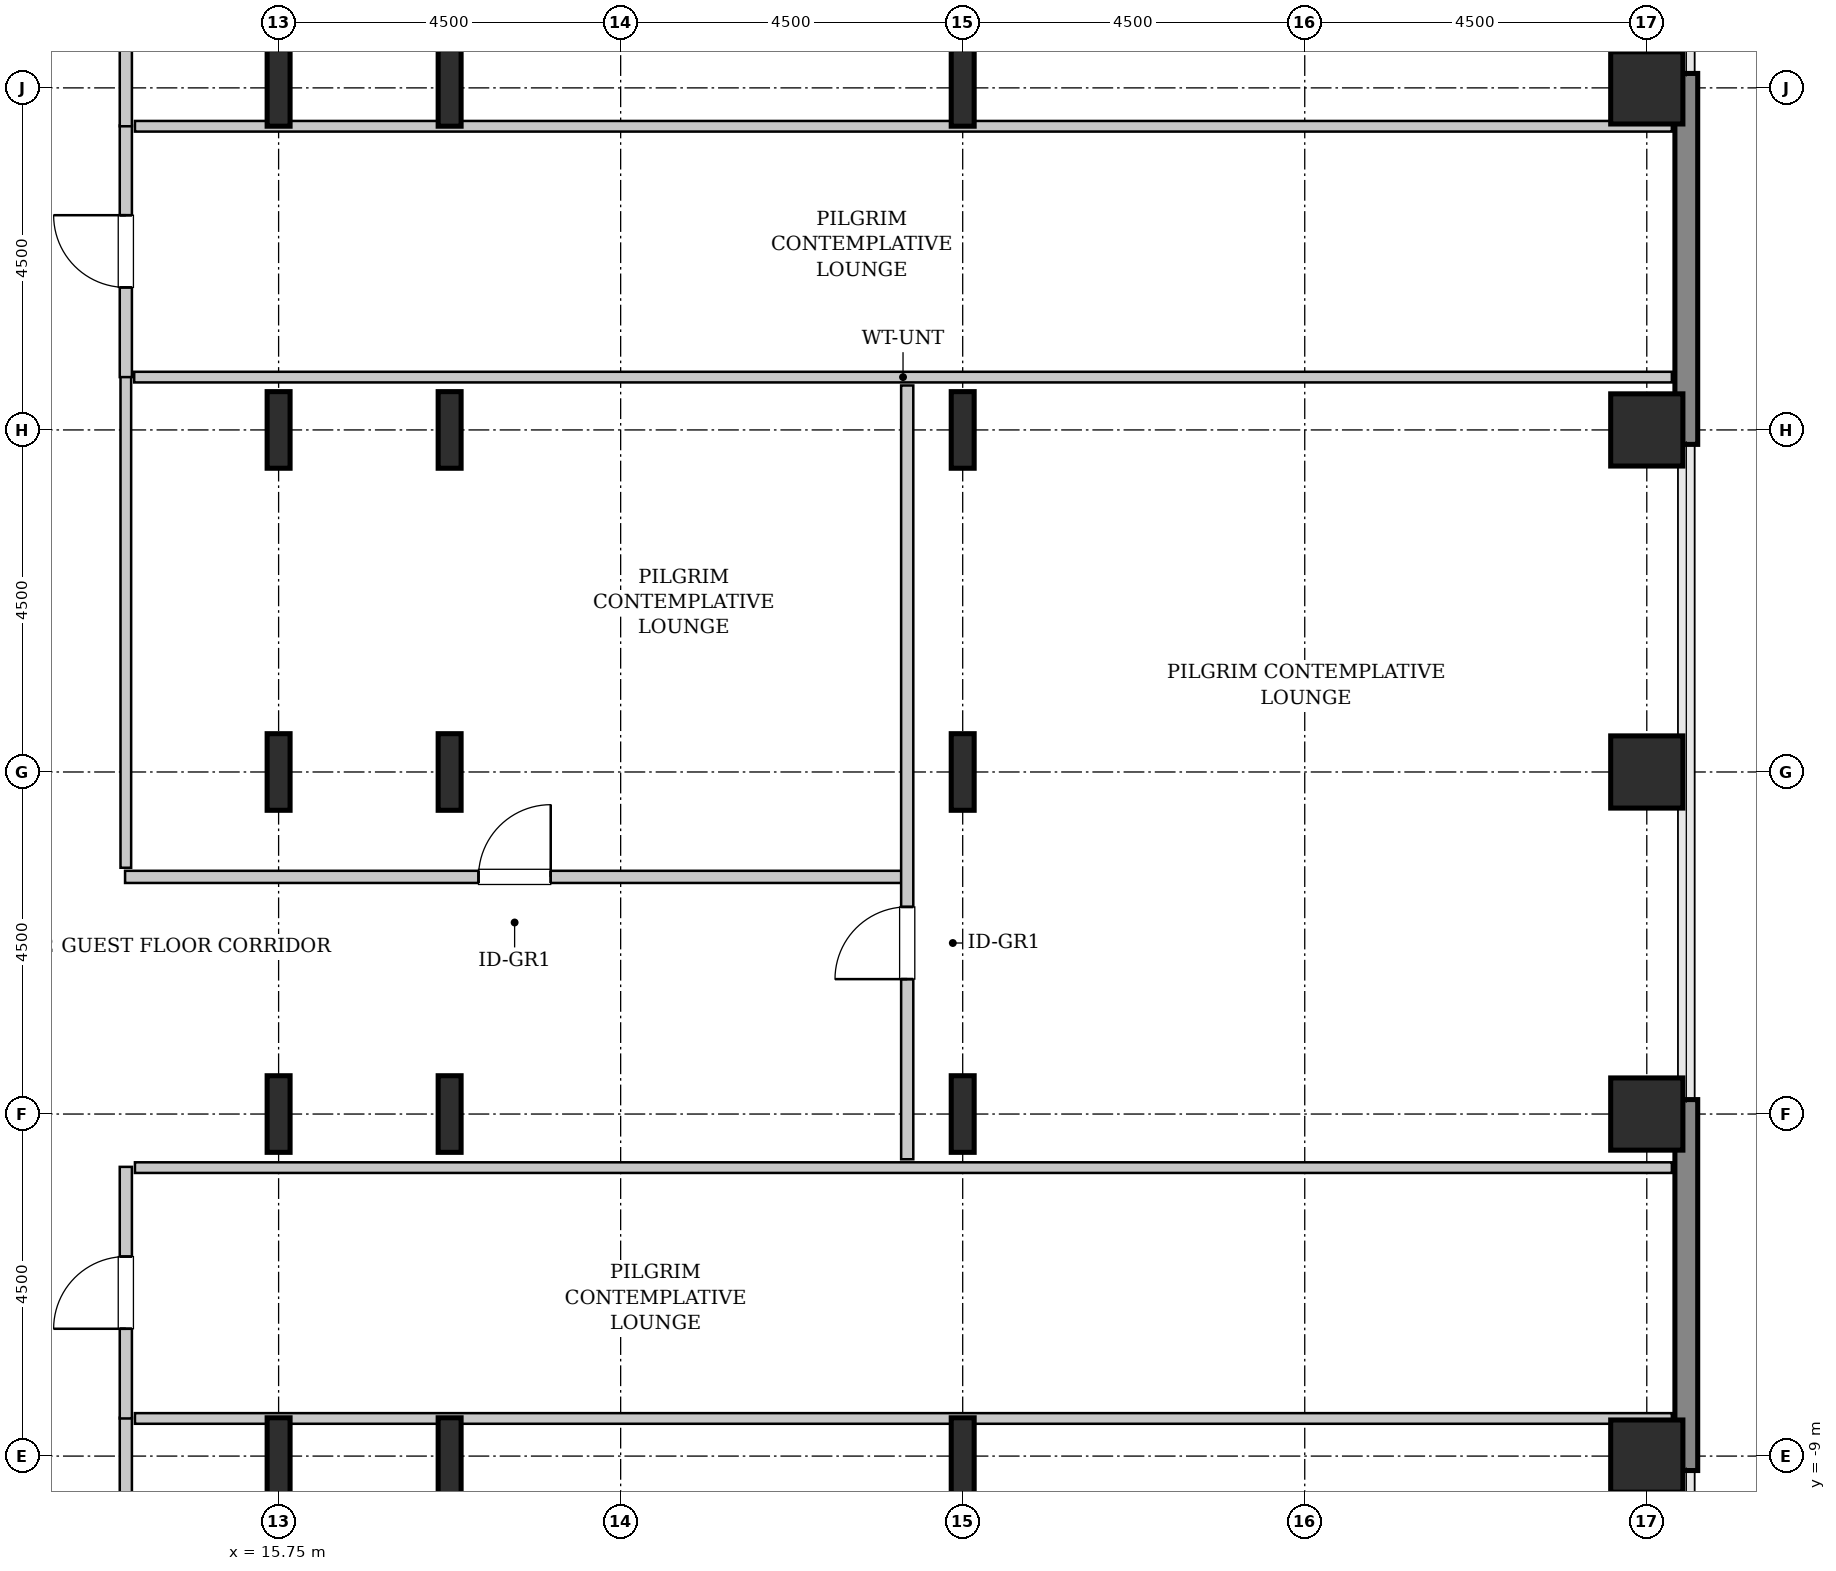
"""IFC4 building model, lengths in metres.
Left out: names, types, materials, properties, quantities, classifications, styles, units other than length and angle.
Written with IfcOpenShell. Run it as: python <this file> out.ifc"""

import sys

from ifc_helpers import new_model, si_unit, direction, frame, frame_2d, origin, origin_2d, place, context, subcontext, project, spatial, rectangle, hollow_rectangle, i_section, extrude, source, transform, mapped, element, fill, save


model = new_model("IFC4")
c1 = context("Model", 3, precision=1e-05, world=origin(), true_north=direction((0.0, 1.0)))
c2 = subcontext(c1, "Body", "Model", "MODEL_VIEW")
j1 = project(units=[si_unit("LENGTHUNIT", "METRE"), si_unit("PLANEANGLEUNIT", "RADIAN")], contexts=[c1])
p1 = place(None, origin())
s1 = spatial("IfcSite", under=j1, at=p1, CompositionType="ELEMENT")
p2 = place(p1, origin())
s2 = spatial("IfcBuilding", under=s1, at=p2, CompositionType="ELEMENT")
p3 = place(p2, frame((0.0, 0.0, 55.8)))
s3 = spatial("IfcBuildingStorey", under=s2, at=p3, CompositionType="ELEMENT", Elevation=55.8)
m1 = source(origin(), c2, "Body", "SweptSolid", [
    extrude(i_section(OverallWidth=0.302, OverallDepth=1.008, WebThickness=0.021, FlangeThickness=0.04, FilletRadius=0.03, at=origin_2d()), origin(), (0.0, 0.0, 1.0), 3.8),
])
for number, where, z_axis, x_axis in (
    (1, (15.75, -9.0, 0.0), (0.0, 0.0, 1.0), (1.0, 0.0, 0.0)),
    (2, (15.75, -4.5, 0.0), (0.0, 0.0, 1.0), (1.0, 0.0, 0.0)),
    (3, (15.75, 0.0, 0.0), (0.0, 0.0, 1.0), (1.0, 0.0, 0.0)),
    (4, (15.75, 4.5, 0.0), (0.0, 0.0, 1.0), (1.0, 0.0, 0.0)),
    (5, (15.75, 9.0, 0.0), (0.0, 0.0, 1.0), (1.0, 0.0, 0.0)),
    (6, (18.0, -9.0, 0.0), (0.0, 0.0, 1.0), (1.0, 0.0, 0.0)),
    (7, (18.0, -4.5, 0.0), (0.0, 0.0, 1.0), (1.0, 0.0, 0.0)),
    (8, (18.0, 0.0, 0.0), (0.0, 0.0, 1.0), (1.0, 0.0, 0.0)),
    (9, (18.0, 4.5, 0.0), (0.0, 0.0, 1.0), (1.0, 0.0, 0.0)),
    (10, (18.0, 9.0, 0.0), (0.0, 0.0, 1.0), (1.0, 0.0, 0.0)),
    (11, (24.75, -9.0, 0.0), (0.0, 0.0, 1.0), (1.0, 0.0, 0.0)),
    (12, (24.75, -4.5, 0.0), (0.0, 0.0, 1.0), (1.0, 0.0, 0.0)),
    (13, (24.75, 0.0, 0.0), (0.0, 0.0, 1.0), (1.0, 0.0, 0.0)),
    (14, (24.75, 4.5, 0.0), (0.0, 0.0, 1.0), (1.0, 0.0, 0.0)),
    (15, (24.75, 9.0, 0.0), (0.0, 0.0, 1.0), (1.0, 0.0, 0.0)),
):
    element("IfcColumn", number, at=place(p3, frame(where, z_axis=z_axis, x_axis=x_axis)), inside=s3, PredefinedType="COLUMN", context=c2, shape_type="MappedRepresentation", body=[
        mapped(m1, transform((0.0, 0.0, 0.0), x_axis=(1.0, 0.0, 0.0), y_axis=(0.0, 1.0, 0.0), z_axis=(0.0, 0.0, 1.0), scale=1.0)),
    ])
m2 = source(origin(), c2, "Body", "SweptSolid", [
    extrude(hollow_rectangle(XDim=0.95, YDim=0.95, WallThickness=0.045, InnerFilletRadius=0.045, OuterFilletRadius=0.09, at=origin_2d()), origin(), (0.0, 0.0, 1.0), 3.8),
])
for number, where, z_axis, x_axis in (
    (16, (33.75, -9.0, 0.0), (0.0, 0.0, 1.0), (1.0, 0.0, 0.0)),
    (17, (33.75, -4.5, 0.0), (0.0, 0.0, 1.0), (1.0, 0.0, 0.0)),
    (18, (33.75, 0.0, 0.0), (0.0, 0.0, 1.0), (1.0, 0.0, 0.0)),
    (19, (33.75, 4.5, 0.0), (0.0, 0.0, 1.0), (1.0, 0.0, 0.0)),
    (20, (33.75, 9.0, 0.0), (0.0, 0.0, 1.0), (1.0, 0.0, 0.0)),
):
    element("IfcColumn", number, at=place(p3, frame(where, z_axis=z_axis, x_axis=x_axis)), inside=s3, PredefinedType="COLUMN", context=c2, shape_type="MappedRepresentation", body=[
        mapped(m2, transform((0.0, 0.0, 0.0), x_axis=(1.0, 0.0, 0.0), y_axis=(0.0, 1.0, 0.0), z_axis=(0.0, 0.0, 1.0), scale=1.0)),
    ])
m3 = source(origin(), c2, "Body", "SweptSolid", [
    extrude(rectangle(XDim=4.88, YDim=0.3, at=frame_2d((2.44, 0.0))), origin(), (0.0, 0.0, 1.0), 3.55),
])
for number, where, z_axis, x_axis in (
    (21, (34.27, -9.19, 0.0), (0.0, 0.0, 1.0), (0.0, 1.0, 0.0)),
    (22, (34.27, 4.31, 0.0), (0.0, 0.0, 1.0), (0.0, 1.0, 0.0)),
):
    element("IfcWall", number, at=place(p3, frame(where, z_axis=z_axis, x_axis=x_axis)), inside=s3, PredefinedType="SHEAR", context=c2, shape_type="MappedRepresentation", body=[
        mapped(m3, transform((0.0, 0.0, 0.0), x_axis=(1.0, 0.0, 0.0), y_axis=(0.0, 1.0, 0.0), z_axis=(0.0, 0.0, 1.0), scale=1.0)),
    ])
m4 = source(origin(), c2, "Body", "SweptSolid", [
    extrude(rectangle(XDim=14.545, YDim=0.16, at=frame_2d((7.272, 0.0))), origin(), (0.0, 0.0, 1.0), 3.535),
])
p4 = place(p3, frame((13.74, -23.04, 0.0), z_axis=(0.0, 0.0, 1.0), x_axis=(0.0, 1.0, 0.0)))
e23 = element("IfcWall", 23, at=p4, inside=s3, PredefinedType="PARTITIONING", context=c2, shape_type="MappedRepresentation", body=[
    mapped(m4, transform((0.0, 0.0, 0.0), x_axis=(1.0, 0.0, 0.0), y_axis=(0.0, 1.0, 0.0), z_axis=(0.0, 0.0, 1.0), scale=1.0)),
])
p5 = place(p4, frame((12.562, 0.0, 0.0)))
e24 = element("IfcOpeningElement", 24, at=p5, cuts=e23, PredefinedType="OPENING", context=c2, shape_type="SweptSolid", body=[
    extrude(rectangle(XDim=0.95, YDim=2.1, at=frame_2d((0.475, 1.05))), frame((0.0, 0.09, 0.0), z_axis=(0.0, -1.0, 0.0), x_axis=(1.0, 0.0, 0.0)), (0.0, 0.0, 1.0), 0.18),
])
m5 = source(origin(), c2, "Body", "SweptSolid", [
    extrude(rectangle(XDim=20.22, YDim=0.14, at=frame_2d((10.11, 0.0))), origin(), (0.0, 0.0, 1.0), 2.825),
])
p6 = place(p3, frame((13.86, -8.505, 0.0), z_axis=(0.0, 0.0, 1.0), x_axis=(1.0, 0.0, 0.0)))
e25 = element("IfcWall", 25, at=p6, inside=s3, PredefinedType="PARTITIONING", context=c2, shape_type="MappedRepresentation", body=[
    mapped(m5, transform((0.0, 0.0, 0.0), x_axis=(1.0, 0.0, 0.0), y_axis=(0.0, 1.0, 0.0), z_axis=(0.0, 0.0, 1.0), scale=1.0)),
])
m6 = source(origin(), c2, "Body", "SweptSolid", [
    extrude(rectangle(XDim=3.31, YDim=0.16, at=frame_2d((1.655, 0.0))), origin(), (0.0, 0.0, 1.0), 3.535),
])
p7 = place(p3, frame((13.74, -8.505, 0.0), z_axis=(0.0, 0.0, 1.0), x_axis=(0.0, 1.0, 0.0)))
e26 = element("IfcWall", 26, at=p7, inside=s3, PredefinedType="PARTITIONING", context=c2, shape_type="MappedRepresentation", body=[
    mapped(m6, transform((0.0, 0.0, 0.0), x_axis=(1.0, 0.0, 0.0), y_axis=(0.0, 1.0, 0.0), z_axis=(0.0, 0.0, 1.0), scale=1.0)),
])
p8 = place(p7, frame((1.18, 0.0, 0.0)))
e27 = element("IfcOpeningElement", 27, at=p8, cuts=e26, PredefinedType="OPENING", context=c2, shape_type="SweptSolid", body=[
    extrude(rectangle(XDim=0.95, YDim=2.1, at=frame_2d((0.475, 1.05))), frame((0.0, 0.09, 0.0), z_axis=(0.0, -1.0, 0.0), x_axis=(1.0, 0.0, 0.0)), (0.0, 0.0, 1.0), 0.18),
])
m7 = source(origin(), c2, "Body", "SweptSolid", [
    extrude(rectangle(XDim=20.22, YDim=0.14, at=frame_2d((10.11, 0.0))), origin(), (0.0, 0.0, 1.0), 3.535),
])
p9 = place(p3, frame((13.86, -5.205, 0.0), z_axis=(0.0, 0.0, 1.0), x_axis=(1.0, 0.0, 0.0)))
e28 = element("IfcWall", 28, at=p9, inside=s3, PredefinedType="PARTITIONING", context=c2, shape_type="MappedRepresentation", body=[
    mapped(m7, transform((0.0, 0.0, 0.0), x_axis=(1.0, 0.0, 0.0), y_axis=(0.0, 1.0, 0.0), z_axis=(0.0, 0.0, 1.0), scale=1.0)),
])
m8 = source(origin(), c2, "Body", "SweptSolid", [
    extrude(rectangle(XDim=10.25, YDim=0.16, at=frame_2d((5.125, 0.0))), origin(), (0.0, 0.0, 1.0), 3.535),
])
p10 = place(p3, frame((13.73, -1.38, 0.0), z_axis=(0.0, 0.0, 1.0), x_axis=(1.0, 0.0, 0.0)))
e29 = element("IfcWall", 29, at=p10, inside=s3, PredefinedType="PARTITIONING", context=c2, shape_type="MappedRepresentation", body=[
    mapped(m8, transform((0.0, 0.0, 0.0), x_axis=(1.0, 0.0, 0.0), y_axis=(0.0, 1.0, 0.0), z_axis=(0.0, 0.0, 1.0), scale=1.0)),
])
p11 = place(p10, frame((4.65, 0.0, 0.0)))
e30 = element("IfcOpeningElement", 30, at=p11, cuts=e29, PredefinedType="OPENING", context=c2, shape_type="SweptSolid", body=[
    extrude(rectangle(XDim=0.95, YDim=2.1, at=frame_2d((0.475, 1.05))), frame((0.0, 0.09, 0.0), z_axis=(0.0, -1.0, 0.0), x_axis=(1.0, 0.0, 0.0)), (0.0, 0.0, 1.0), 0.18),
])
m9 = source(origin(), c2, "Body", "SweptSolid", [
    extrude(rectangle(XDim=6.465, YDim=0.14, at=frame_2d((3.232, 0.0))), origin(), (0.0, 0.0, 1.0), 3.535),
])
p12 = place(p3, frame((13.74, -1.26, 0.0), z_axis=(0.0, 0.0, 1.0), x_axis=(0.0, 1.0, 0.0)))
e31 = element("IfcWall", 31, at=p12, inside=s3, PredefinedType="PARTITIONING", context=c2, shape_type="MappedRepresentation", body=[
    mapped(m9, transform((0.0, 0.0, 0.0), x_axis=(1.0, 0.0, 0.0), y_axis=(0.0, 1.0, 0.0), z_axis=(0.0, 0.0, 1.0), scale=1.0)),
])
m10 = source(origin(), c2, "Body", "SweptSolid", [
    extrude(rectangle(XDim=20.23, YDim=0.14, at=frame_2d((10.115, 0.0))), origin(), (0.0, 0.0, 1.0), 3.535),
])
p13 = place(p3, frame((13.85, 5.195, 0.0), z_axis=(0.0, 0.0, 1.0), x_axis=(1.0, 0.0, 0.0)))
e32 = element("IfcWall", 32, at=p13, inside=s3, PredefinedType="PARTITIONING", context=c2, shape_type="MappedRepresentation", body=[
    mapped(m10, transform((0.0, 0.0, 0.0), x_axis=(1.0, 0.0, 0.0), y_axis=(0.0, 1.0, 0.0), z_axis=(0.0, 0.0, 1.0), scale=1.0)),
])
m11 = source(origin(), c2, "Body", "SweptSolid", [
    extrude(rectangle(XDim=10.18, YDim=0.16, at=frame_2d((5.09, 0.0))), origin(), (0.0, 0.0, 1.0), 3.535),
])
p14 = place(p3, frame((24.02, -5.095, 0.0), z_axis=(0.0, 0.0, 1.0), x_axis=(0.0, 1.0, 0.0)))
e33 = element("IfcWall", 33, at=p14, inside=s3, PredefinedType="PARTITIONING", context=c2, shape_type="MappedRepresentation", body=[
    mapped(m11, transform((0.0, 0.0, 0.0), x_axis=(1.0, 0.0, 0.0), y_axis=(0.0, 1.0, 0.0), z_axis=(0.0, 0.0, 1.0), scale=1.0)),
])
p15 = place(p14, frame((2.37, 0.0, 0.0)))
e34 = element("IfcOpeningElement", 34, at=p15, cuts=e33, PredefinedType="OPENING", context=c2, shape_type="SweptSolid", body=[
    extrude(rectangle(XDim=0.95, YDim=2.1, at=frame_2d((0.475, 1.05))), frame((0.0, 0.09, 0.0), z_axis=(0.0, -1.0, 0.0), x_axis=(1.0, 0.0, 0.0)), (0.0, 0.0, 1.0), 0.18),
])
p16 = place(p3, frame((13.74, 5.195, 0.0), z_axis=(0.0, 0.0, 1.0), x_axis=(0.0, 1.0, 0.0)))
e35 = element("IfcWall", 35, at=p16, inside=s3, PredefinedType="PARTITIONING", context=c2, shape_type="MappedRepresentation", body=[
    mapped(m6, transform((0.0, 0.0, 0.0), x_axis=(1.0, 0.0, 0.0), y_axis=(0.0, 1.0, 0.0), z_axis=(0.0, 0.0, 1.0), scale=1.0)),
])
p17 = place(p16, frame((1.18, 0.0, 0.0)))
e36 = element("IfcOpeningElement", 36, at=p17, cuts=e35, PredefinedType="OPENING", context=c2, shape_type="SweptSolid", body=[
    extrude(rectangle(XDim=0.95, YDim=2.1, at=frame_2d((0.475, 1.05))), frame((0.0, 0.09, 0.0), z_axis=(0.0, -1.0, 0.0), x_axis=(1.0, 0.0, 0.0)), (0.0, 0.0, 1.0), 0.18),
])
p18 = place(p3, frame((13.86, 8.495, 0.0), z_axis=(0.0, 0.0, 1.0), x_axis=(1.0, 0.0, 0.0)))
e37 = element("IfcWall", 37, at=p18, inside=s3, PredefinedType="PARTITIONING", context=c2, shape_type="MappedRepresentation", body=[
    mapped(m5, transform((0.0, 0.0, 0.0), x_axis=(1.0, 0.0, 0.0), y_axis=(0.0, 1.0, 0.0), z_axis=(0.0, 0.0, 1.0), scale=1.0)),
])
p19 = place(p3, frame((13.74, 8.495, 0.0), z_axis=(0.0, 0.0, 1.0), x_axis=(0.0, 1.0, 0.0)))
e38 = element("IfcWall", 38, at=p19, inside=s3, PredefinedType="PARTITIONING", context=c2, shape_type="MappedRepresentation", body=[
    mapped(m4, transform((0.0, 0.0, 0.0), x_axis=(1.0, 0.0, 0.0), y_axis=(0.0, 1.0, 0.0), z_axis=(0.0, 0.0, 1.0), scale=1.0)),
])
p20 = place(p19, frame((1.032, 0.0, 0.0)))
e39 = element("IfcOpeningElement", 39, at=p20, cuts=e38, PredefinedType="OPENING", context=c2, shape_type="SweptSolid", body=[
    extrude(rectangle(XDim=0.95, YDim=2.1, at=frame_2d((0.475, 1.05))), frame((0.0, 0.09, 0.0), z_axis=(0.0, -1.0, 0.0), x_axis=(1.0, 0.0, 0.0)), (0.0, 0.0, 1.0), 0.18),
])
m12 = source(origin(), c2, "Body", "SweptSolid", [
    extrude(rectangle(XDim=0.95, YDim=2.1, at=frame_2d((0.475, 1.05))), frame((0.0, 0.025, 0.0), z_axis=(0.0, -1.0, 0.0), x_axis=(1.0, 0.0, 0.0)), (0.0, 0.0, 1.0), 0.05),
])
p21 = place(p8, origin())
e40 = element("IfcDoor", 40, at=p21, inside=s3, OperationType="SINGLE_SWING_LEFT", PredefinedType="DOOR", context=c2, shape_type="MappedRepresentation", body=[
    mapped(m12, transform((0.0, 0.0, 0.0), x_axis=(1.0, 0.0, 0.0), y_axis=(0.0, 1.0, 0.0), z_axis=(0.0, 0.0, 1.0), scale=1.0)),
])
fill(e27, e40)
p22 = place(p11, origin())
e41 = element("IfcDoor", 41, at=p22, inside=s3, OperationType="SINGLE_SWING_RIGHT", PredefinedType="DOOR", context=c2, shape_type="MappedRepresentation", body=[
    mapped(m12, transform((0.0, 0.0, 0.0), x_axis=(1.0, 0.0, 0.0), y_axis=(0.0, 1.0, 0.0), z_axis=(0.0, 0.0, 1.0), scale=1.0)),
])
fill(e30, e41)
p23 = place(p15, origin())
e42 = element("IfcDoor", 42, at=p23, inside=s3, OperationType="SINGLE_SWING_LEFT", PredefinedType="DOOR", context=c2, shape_type="MappedRepresentation", body=[
    mapped(m12, transform((0.0, 0.0, 0.0), x_axis=(1.0, 0.0, 0.0), y_axis=(0.0, 1.0, 0.0), z_axis=(0.0, 0.0, 1.0), scale=1.0)),
])
fill(e34, e42)
p24 = place(p17, origin())
e43 = element("IfcDoor", 43, at=p24, inside=s3, OperationType="SINGLE_SWING_RIGHT", PredefinedType="DOOR", context=c2, shape_type="MappedRepresentation", body=[
    mapped(m12, transform((0.0, 0.0, 0.0), x_axis=(1.0, 0.0, 0.0), y_axis=(0.0, 1.0, 0.0), z_axis=(0.0, 0.0, 1.0), scale=1.0)),
])
fill(e36, e43)
save(model, sys.argv[1])
